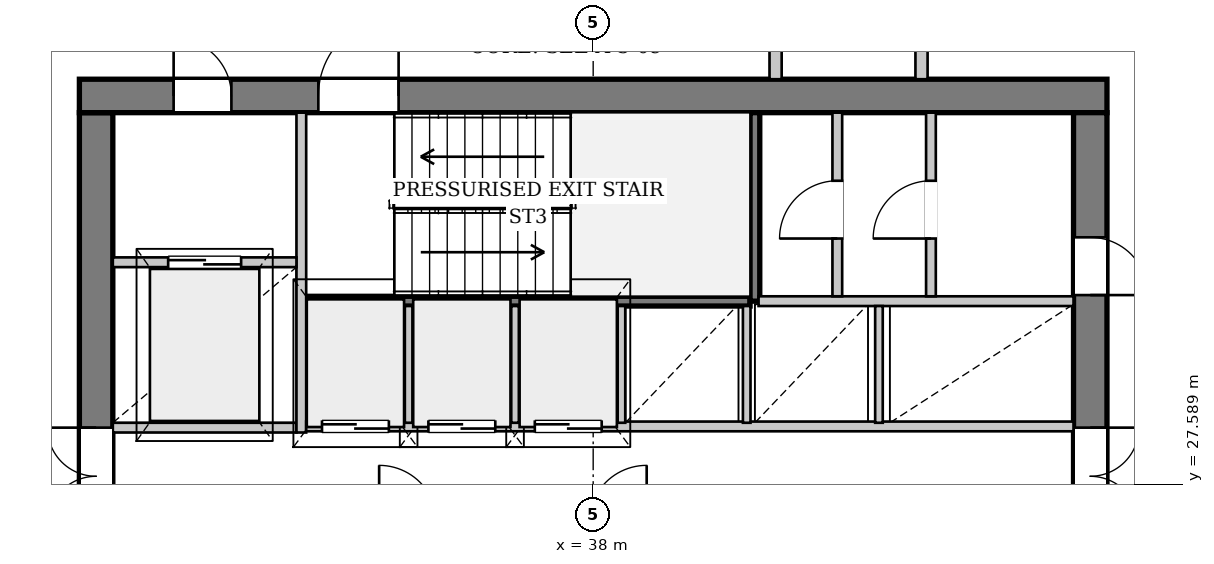
"""IFC4 building model, lengths in metres.
Left out: names, types, materials, properties, quantities, classifications, styles, units other than length and angle.
Written with IfcOpenShell. Run it as: python <this file> out.ifc"""

import sys

from ifc_helpers import new_model, si_unit, direction, frame, frame_2d, origin, place, context, subcontext, project, spatial, rectangle, extrude, source, transform, mapped, element, fill, save


model = new_model("IFC4")
c1 = context("Model", 3, precision=1e-05, world=origin(), true_north=direction((0.0, 1.0)))
c2 = subcontext(c1, "Body", "Model", "MODEL_VIEW")
j1 = project(units=[si_unit("LENGTHUNIT", "METRE"), si_unit("PLANEANGLEUNIT", "RADIAN")], contexts=[c1])
p1 = place(None, origin())
s1 = spatial("IfcSite", under=j1, at=p1, CompositionType="ELEMENT")
p2 = place(p1, origin())
s2 = spatial("IfcBuilding", under=s1, at=p2, CompositionType="ELEMENT")
p3 = place(p2, frame((0.0, 0.0, 150.15)))
s3 = spatial("IfcBuildingStorey", under=s2, at=p3, CompositionType="ELEMENT", Elevation=150.15)
p4 = place(p3, frame((29.825, 19.5, 0.0), z_axis=(0.0, 0.0, 1.0), x_axis=(0.0, 1.0, 0.0)))
e1 = element("IfcWall", 1, at=p4, inside=s3, PredefinedType="SHEAR", context=c2, shape_type="SweptSolid", body=[
    extrude(rectangle(XDim=14.2, YDim=0.55, at=frame_2d((7.1, 0.0))), origin(), (0.0, 0.0, 1.0), 3.3),
])
p5 = place(p4, frame((7.42, 0.0, 0.0)))
e2 = element("IfcOpeningElement", 2, at=p5, cuts=e1, PredefinedType="OPENING", context=c2, shape_type="SweptSolid", body=[
    extrude(rectangle(XDim=1.6, YDim=2.2, at=frame_2d((0.8, 1.1))), frame((0.0, 0.285, 0.0), z_axis=(0.0, -1.0, 0.0), x_axis=(1.0, 0.0, 0.0)), (0.0, 0.0, 1.0), 0.57),
])
p6 = place(p3, frame((29.55, 33.975, 0.0), z_axis=(0.0, 0.0, 1.0), x_axis=(1.0, 0.0, 0.0)))
e3 = element("IfcWall", 3, at=p6, inside=s3, PredefinedType="SHEAR", context=c2, shape_type="SweptSolid", body=[
    extrude(rectangle(XDim=16.9, YDim=0.55, at=frame_2d((8.45, 0.0))), origin(), (0.0, 0.0, 1.0), 3.3),
])
p7 = place(p6, frame((1.55, 0.0, 0.0)))
e4 = element("IfcOpeningElement", 4, at=p7, cuts=e3, PredefinedType="OPENING", context=c2, shape_type="SweptSolid", body=[
    extrude(rectangle(XDim=0.95, YDim=2.1, at=frame_2d((0.475, 1.05))), frame((0.0, 0.285, 0.0), z_axis=(0.0, -1.0, 0.0), x_axis=(1.0, 0.0, 0.0)), (0.0, 0.0, 1.0), 0.57),
])
p8 = place(p6, frame((3.93, 0.0, 0.0)))
e5 = element("IfcOpeningElement", 5, at=p8, cuts=e3, PredefinedType="OPENING", context=c2, shape_type="SweptSolid", body=[
    extrude(rectangle(XDim=1.32, YDim=2.2, at=frame_2d((0.66, 1.1))), frame((0.0, 0.285, 0.0), z_axis=(0.0, -1.0, 0.0), x_axis=(1.0, 0.0, 0.0)), (0.0, 0.0, 1.0), 0.57),
])
p9 = place(p3, frame((46.175, 33.7, 0.0), z_axis=(0.0, 0.0, 1.0), x_axis=(0.0, -1.0, 0.0)))
e6 = element("IfcWall", 6, at=p9, inside=s3, PredefinedType="SHEAR", context=c2, shape_type="SweptSolid", body=[
    extrude(rectangle(XDim=14.2, YDim=0.55, at=frame_2d((7.1, 0.0))), origin(), (0.0, 0.0, 1.0), 3.3),
])
p10 = place(p9, frame((5.18, 0.0, 0.0)))
e7 = element("IfcOpeningElement", 7, at=p10, cuts=e6, PredefinedType="OPENING", context=c2, shape_type="SweptSolid", body=[
    extrude(rectangle(XDim=1.6, YDim=2.2, at=frame_2d((0.8, 1.1))), frame((0.0, 0.285, 0.0), z_axis=(0.0, -1.0, 0.0), x_axis=(1.0, 0.0, 0.0)), (0.0, 0.0, 1.0), 0.57),
])
p11 = place(p9, frame((2.05, 0.0, 0.0)))
e8 = element("IfcOpeningElement", 8, at=p11, cuts=e6, PredefinedType="OPENING", context=c2, shape_type="SweptSolid", body=[
    extrude(rectangle(XDim=0.95, YDim=2.1, at=frame_2d((0.475, 1.05))), frame((0.0, 0.285, 0.0), z_axis=(0.0, -1.0, 0.0), x_axis=(1.0, 0.0, 0.0)), (0.0, 0.0, 1.0), 0.57),
])
p12 = place(p3, frame((33.28, 30.6, 0.0), z_axis=(0.0, 0.0, 1.0), x_axis=(1.0, 0.0, 0.0)))
e9 = element("IfcWall", 9, at=p12, inside=s3, PredefinedType="PARTITIONING", context=c2, shape_type="SweptSolid", body=[
    extrude(rectangle(XDim=7.3, YDim=0.16, at=frame_2d((3.65, 0.0))), origin(), (0.0, 0.0, 1.0), 3.3),
])
p13 = place(p3, frame((40.66, 30.6, 0.0), z_axis=(0.0, 0.0, 1.0), x_axis=(0.0, 1.0, 0.0)))
e10 = element("IfcWall", 10, at=p13, inside=s3, PredefinedType="PARTITIONING", context=c2, shape_type="SweptSolid", body=[
    extrude(rectangle(XDim=3.1, YDim=0.16, at=frame_2d((1.55, 0.0))), origin(), (0.0, 0.0, 1.0), 3.3),
])
p14 = place(p3, frame((30.1, 28.52, 0.0), z_axis=(0.0, 0.0, 1.0), x_axis=(1.0, 0.0, 0.0)))
e11 = element("IfcWall", 11, at=p14, inside=s3, PredefinedType="PARTITIONING", context=c2, shape_type="SweptSolid", body=[
    extrude(rectangle(XDim=3.02, YDim=0.16, at=frame_2d((1.51, 0.0))), origin(), (0.0, 0.0, 1.0), 3.3),
])
p15 = place(p3, frame((33.2, 28.44, 0.0), z_axis=(0.0, 0.0, 1.0), x_axis=(0.0, 1.0, 0.0)))
e12 = element("IfcWall", 12, at=p15, inside=s3, PredefinedType="PARTITIONING", context=c2, shape_type="SweptSolid", body=[
    extrude(rectangle(XDim=5.26, YDim=0.16, at=frame_2d((2.63, 0.0))), origin(), (0.0, 0.0, 1.0), 3.3),
])
p16 = place(p3, frame((30.1, 31.24, 0.0), z_axis=(0.0, 0.0, 1.0), x_axis=(1.0, 0.0, 0.0)))
e13 = element("IfcWall", 13, at=p16, inside=s3, PredefinedType="PARTITIONING", context=c2, shape_type="SweptSolid", body=[
    extrude(rectangle(XDim=3.02, YDim=0.16, at=frame_2d((1.51, 0.0))), origin(), (0.0, 0.0, 1.0), 3.3),
])
p17 = place(p16, frame((0.91, 0.0, 0.0)))
e14 = element("IfcOpeningElement", 14, at=p17, cuts=e13, PredefinedType="OPENING", context=c2, shape_type="SweptSolid", body=[
    extrude(rectangle(XDim=1.2, YDim=2.2, at=frame_2d((0.6, 1.1))), frame((0.0, 0.09, 0.0), z_axis=(0.0, -1.0, 0.0), x_axis=(1.0, 0.0, 0.0)), (0.0, 0.0, 1.0), 0.18),
])
p18 = place(p3, frame((33.28, 28.54, 0.0), z_axis=(0.0, 0.0, 1.0), x_axis=(1.0, 0.0, 0.0)))
e15 = element("IfcWall", 15, at=p18, inside=s3, PredefinedType="PARTITIONING", context=c2, shape_type="SweptSolid", body=[
    extrude(rectangle(XDim=12.62, YDim=0.16, at=frame_2d((6.31, 0.0))), origin(), (0.0, 0.0, 1.0), 3.3),
])
p19 = place(p18, frame((0.26, 0.0, 0.0)))
e16 = element("IfcOpeningElement", 16, at=p19, cuts=e15, PredefinedType="OPENING", context=c2, shape_type="SweptSolid", body=[
    extrude(rectangle(XDim=1.1, YDim=2.2, at=frame_2d((0.55, 1.1))), frame((0.0, 0.09, 0.0), z_axis=(0.0, -1.0, 0.0), x_axis=(1.0, 0.0, 0.0)), (0.0, 0.0, 1.0), 0.18),
])
p20 = place(p18, frame((2.01, 0.0, 0.0)))
e17 = element("IfcOpeningElement", 17, at=p20, cuts=e15, PredefinedType="OPENING", context=c2, shape_type="SweptSolid", body=[
    extrude(rectangle(XDim=1.1, YDim=2.2, at=frame_2d((0.55, 1.1))), frame((0.0, 0.09, 0.0), z_axis=(0.0, -1.0, 0.0), x_axis=(1.0, 0.0, 0.0)), (0.0, 0.0, 1.0), 0.18),
])
p21 = place(p18, frame((3.76, 0.0, 0.0)))
e18 = element("IfcOpeningElement", 18, at=p21, cuts=e15, PredefinedType="OPENING", context=c2, shape_type="SweptSolid", body=[
    extrude(rectangle(XDim=1.1, YDim=2.2, at=frame_2d((0.55, 1.1))), frame((0.0, 0.09, 0.0), z_axis=(0.0, -1.0, 0.0), x_axis=(1.0, 0.0, 0.0)), (0.0, 0.0, 1.0), 0.18),
])
p22 = place(p3, frame((40.72, 30.6, 0.0), z_axis=(0.0, 0.0, 1.0), x_axis=(1.0, 0.0, 0.0)))
e19 = element("IfcWall", 19, at=p22, inside=s3, PredefinedType="PARTITIONING", context=c2, shape_type="SweptSolid", body=[
    extrude(rectangle(XDim=5.18, YDim=0.16, at=frame_2d((2.59, 0.0))), origin(), (0.0, 0.0, 1.0), 3.3),
])
for number, where, z_axis, x_axis in (
    (20, (34.965, 28.6, 0.0), (0.0, 0.0, 1.0), (0.0, 1.0, 0.0)),
    (21, (36.715, 28.6, 0.0), (0.0, 0.0, 1.0), (0.0, 1.0, 0.0)),
    (22, (38.465, 28.6, 0.0), (0.0, 0.0, 1.0), (0.0, 1.0, 0.0)),
    (23, (40.525, 28.6, 0.0), (0.0, 0.0, 1.0), (0.0, 1.0, 0.0)),
    (24, (42.7, 28.6, 0.0), (0.0, 0.0, 1.0), (0.0, 1.0, 0.0)),
):
    element("IfcWall", number, at=place(p3, frame(where, z_axis=z_axis, x_axis=x_axis)), inside=s3, PredefinedType="PARTITIONING", context=c2, shape_type="SweptSolid", body=[
        extrude(rectangle(XDim=1.92, YDim=0.125, at=frame_2d((0.96, 0.0))), origin(), (0.0, 0.0, 1.0), 3.3),
    ])
p23 = place(p3, frame((42.015, 30.68, 0.0), z_axis=(0.0, 0.0, 1.0), x_axis=(0.0, 1.0, 0.0)))
e25 = element("IfcWall", 25, at=p23, inside=s3, PredefinedType="PARTITIONING", context=c2, shape_type="SweptSolid", body=[
    extrude(rectangle(XDim=3.02, YDim=0.16, at=frame_2d((1.51, 0.0))), origin(), (0.0, 0.0, 1.0), 3.3),
])
p24 = place(p23, frame((0.95, 0.0, 0.0)))
e26 = element("IfcOpeningElement", 26, at=p24, cuts=e25, PredefinedType="OPENING", context=c2, shape_type="SweptSolid", body=[
    extrude(rectangle(XDim=0.95, YDim=2.1, at=frame_2d((0.475, 1.05))), frame((0.0, 0.09, 0.0), z_axis=(0.0, -1.0, 0.0), x_axis=(1.0, 0.0, 0.0)), (0.0, 0.0, 1.0), 0.18),
])
p25 = place(p3, frame((43.555, 30.68, 0.0), z_axis=(0.0, 0.0, 1.0), x_axis=(0.0, 1.0, 0.0)))
e27 = element("IfcWall", 27, at=p25, inside=s3, PredefinedType="PARTITIONING", context=c2, shape_type="SweptSolid", body=[
    extrude(rectangle(XDim=3.02, YDim=0.16, at=frame_2d((1.51, 0.0))), origin(), (0.0, 0.0, 1.0), 3.3),
])
p26 = place(p25, frame((0.95, 0.0, 0.0)))
e28 = element("IfcOpeningElement", 28, at=p26, cuts=e27, PredefinedType="OPENING", context=c2, shape_type="SweptSolid", body=[
    extrude(rectangle(XDim=0.95, YDim=2.1, at=frame_2d((0.475, 1.05))), frame((0.0, 0.09, 0.0), z_axis=(0.0, -1.0, 0.0), x_axis=(1.0, 0.0, 0.0)), (0.0, 0.0, 1.0), 0.18),
])
for number, where, z_axis, x_axis in (
    (29, (41.0, 34.25, 0.0), (0.0, 0.0, 1.0), (0.0, 1.0, 0.0)),
    (30, (43.4, 34.25, 0.0), (0.0, 0.0, 1.0), (0.0, 1.0, 0.0)),
):
    element("IfcWall", number, at=place(p3, frame(where, z_axis=z_axis, x_axis=x_axis)), inside=s3, PredefinedType="PARTITIONING", context=c2, shape_type="SweptSolid", body=[
        extrude(rectangle(XDim=1.95, YDim=0.2, at=frame_2d((0.975, 0.0))), origin(), (0.0, 0.0, 1.0), 3.3),
    ])
m1 = source(origin(), c2, "Body", "SweptSolid", [
    extrude(rectangle(XDim=1.6, YDim=2.2, at=frame_2d((0.8, 1.1))), frame((0.0, 0.025, 0.0), z_axis=(0.0, -1.0, 0.0), x_axis=(1.0, 0.0, 0.0)), (0.0, 0.0, 1.0), 0.05),
])
p27 = place(p5, origin())
e31 = element("IfcDoor", 31, at=p27, inside=s3, OperationType="DOUBLE_DOOR_SINGLE_SWING", PredefinedType="DOOR", context=c2, shape_type="MappedRepresentation", body=[
    mapped(m1, transform((0.0, 0.0, 0.0), x_axis=(1.0, 0.0, 0.0), y_axis=(0.0, 1.0, 0.0), z_axis=(0.0, 0.0, 1.0), scale=1.0)),
])
fill(e2, e31)
m2 = source(origin(), c2, "Body", "SweptSolid", [
    extrude(rectangle(XDim=0.95, YDim=2.1, at=frame_2d((0.475, 1.05))), frame((0.0, 0.025, 0.0), z_axis=(0.0, -1.0, 0.0), x_axis=(1.0, 0.0, 0.0)), (0.0, 0.0, 1.0), 0.05),
])
p28 = place(p7, origin())
e32 = element("IfcDoor", 32, at=p28, inside=s3, OperationType="SINGLE_SWING_LEFT", PredefinedType="DOOR", context=c2, shape_type="MappedRepresentation", body=[
    mapped(m2, transform((0.0, 0.0, 0.0), x_axis=(1.0, 0.0, 0.0), y_axis=(0.0, 1.0, 0.0), z_axis=(0.0, 0.0, 1.0), scale=1.0)),
])
fill(e4, e32)
m3 = source(origin(), c2, "Body", "SweptSolid", [
    extrude(rectangle(XDim=1.32, YDim=2.2, at=frame_2d((0.66, 1.1))), frame((0.0, 0.025, 0.0), z_axis=(0.0, -1.0, 0.0), x_axis=(1.0, 0.0, 0.0)), (0.0, 0.0, 1.0), 0.05),
])
p29 = place(p8, origin())
e33 = element("IfcDoor", 33, at=p29, inside=s3, OperationType="SINGLE_SWING_RIGHT", PredefinedType="DOOR", context=c2, shape_type="MappedRepresentation", body=[
    mapped(m3, transform((0.0, 0.0, 0.0), x_axis=(1.0, 0.0, 0.0), y_axis=(0.0, 1.0, 0.0), z_axis=(0.0, 0.0, 1.0), scale=1.0)),
])
fill(e5, e33)
p30 = place(p10, origin())
e34 = element("IfcDoor", 34, at=p30, inside=s3, OperationType="DOUBLE_DOOR_SINGLE_SWING", PredefinedType="DOOR", context=c2, shape_type="MappedRepresentation", body=[
    mapped(m1, transform((0.0, 0.0, 0.0), x_axis=(1.0, 0.0, 0.0), y_axis=(0.0, 1.0, 0.0), z_axis=(0.0, 0.0, 1.0), scale=1.0)),
])
fill(e7, e34)
m4 = source(origin(), c2, "Body", "SweptSolid", [
    extrude(rectangle(XDim=1.2, YDim=2.2, at=frame_2d((0.6, 1.1))), frame((0.0, 0.025, 0.0), z_axis=(0.0, -1.0, 0.0), x_axis=(1.0, 0.0, 0.0)), (0.0, 0.0, 1.0), 0.05),
])
p31 = place(p17, origin())
e35 = element("IfcDoor", 35, at=p31, inside=s3, OperationType="DOUBLE_DOOR_SLIDING", PredefinedType="DOOR", context=c2, shape_type="MappedRepresentation", body=[
    mapped(m4, transform((0.0, 0.0, 0.0), x_axis=(1.0, 0.0, 0.0), y_axis=(0.0, 1.0, 0.0), z_axis=(0.0, 0.0, 1.0), scale=1.0)),
])
fill(e14, e35)
m5 = source(origin(), c2, "Body", "SweptSolid", [
    extrude(rectangle(XDim=1.1, YDim=2.2, at=frame_2d((0.55, 1.1))), frame((0.0, 0.025, 0.0), z_axis=(0.0, -1.0, 0.0), x_axis=(1.0, 0.0, 0.0)), (0.0, 0.0, 1.0), 0.05),
])
p32 = place(p19, origin())
e36 = element("IfcDoor", 36, at=p32, inside=s3, OperationType="DOUBLE_DOOR_SLIDING", PredefinedType="DOOR", context=c2, shape_type="MappedRepresentation", body=[
    mapped(m5, transform((0.0, 0.0, 0.0), x_axis=(1.0, 0.0, 0.0), y_axis=(0.0, 1.0, 0.0), z_axis=(0.0, 0.0, 1.0), scale=1.0)),
])
fill(e16, e36)
p33 = place(p20, origin())
e37 = element("IfcDoor", 37, at=p33, inside=s3, OperationType="DOUBLE_DOOR_SLIDING", PredefinedType="DOOR", context=c2, shape_type="MappedRepresentation", body=[
    mapped(m5, transform((0.0, 0.0, 0.0), x_axis=(1.0, 0.0, 0.0), y_axis=(0.0, 1.0, 0.0), z_axis=(0.0, 0.0, 1.0), scale=1.0)),
])
fill(e17, e37)
p34 = place(p21, origin())
e38 = element("IfcDoor", 38, at=p34, inside=s3, OperationType="DOUBLE_DOOR_SLIDING", PredefinedType="DOOR", context=c2, shape_type="MappedRepresentation", body=[
    mapped(m5, transform((0.0, 0.0, 0.0), x_axis=(1.0, 0.0, 0.0), y_axis=(0.0, 1.0, 0.0), z_axis=(0.0, 0.0, 1.0), scale=1.0)),
])
fill(e18, e38)
p35 = place(p24, origin())
e39 = element("IfcDoor", 39, at=p35, inside=s3, OperationType="SINGLE_SWING_LEFT", PredefinedType="DOOR", context=c2, shape_type="MappedRepresentation", body=[
    mapped(m2, transform((0.0, 0.0, 0.0), x_axis=(1.0, 0.0, 0.0), y_axis=(0.0, 1.0, 0.0), z_axis=(0.0, 0.0, 1.0), scale=1.0)),
])
fill(e26, e39)
p36 = place(p26, origin())
e40 = element("IfcDoor", 40, at=p36, inside=s3, OperationType="SINGLE_SWING_LEFT", PredefinedType="DOOR", context=c2, shape_type="MappedRepresentation", body=[
    mapped(m2, transform((0.0, 0.0, 0.0), x_axis=(1.0, 0.0, 0.0), y_axis=(0.0, 1.0, 0.0), z_axis=(0.0, 0.0, 1.0), scale=1.0)),
])
fill(e28, e40)
p37 = place(p11, origin())
e41 = element("IfcDoor", 41, at=p37, inside=s3, OperationType="SINGLE_SWING_RIGHT", PredefinedType="DOOR", context=c2, shape_type="MappedRepresentation", body=[
    mapped(m2, transform((0.0, 0.0, 0.0), x_axis=(1.0, 0.0, 0.0), y_axis=(0.0, 1.0, 0.0), z_axis=(0.0, 0.0, 1.0), scale=1.0)),
])
fill(e8, e41)
save(model, sys.argv[1])
